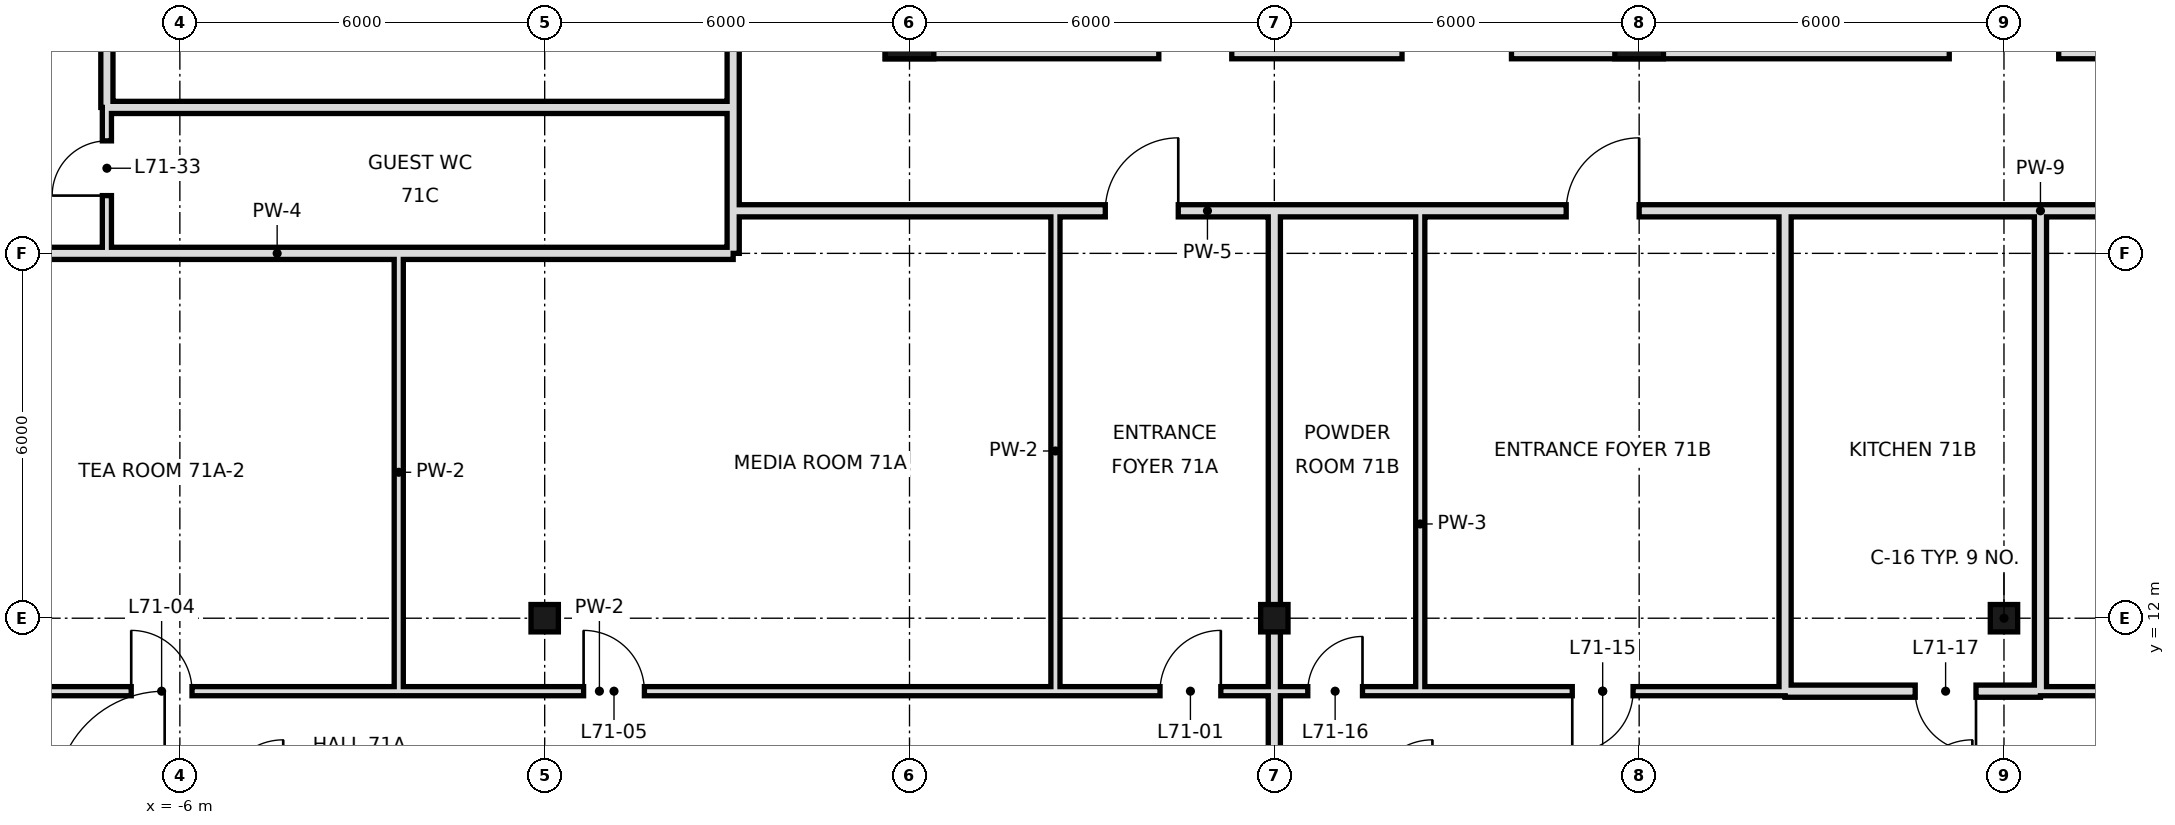
"""IFC4 building model, lengths in metres.
Left out: names, types, materials, properties, quantities, classifications, styles, units other than length and angle.
Written with IfcOpenShell. Run it as: python <this file> out.ifc"""

import sys

from ifc_helpers import new_model, si_unit, direction, frame, frame_2d, origin, origin_2d, place, context, subcontext, project, spatial, rectangle, hollow_rectangle, extrude, element, fill, save


model = new_model("IFC4")
c1 = context("Model", 3, precision=1e-05, world=origin(), true_north=direction((0.0, 1.0)))
c2 = subcontext(c1, "Body", "Model", "MODEL_VIEW")
j1 = project(units=[si_unit("LENGTHUNIT", "METRE"), si_unit("PLANEANGLEUNIT", "RADIAN")], contexts=[c1])
p1 = place(None, origin())
s1 = spatial("IfcSite", under=j1, at=p1, CompositionType="ELEMENT")
p2 = place(p1, origin())
s2 = spatial("IfcBuilding", under=s1, at=p2, CompositionType="ELEMENT")
p3 = place(p2, frame((0.0, 0.0, 301.6)))
s3 = spatial("IfcBuildingStorey", under=s2, at=p3, CompositionType="ELEMENT", Elevation=301.6)
p4 = place(p3, frame((0.0, 12.0, 0.0), z_axis=(0.0, 0.0, 1.0), x_axis=(1.0, 0.0, 0.0)))
e1 = element("IfcColumn", 1, at=p4, inside=s3, PredefinedType="COLUMN", context=c2, shape_type="SweptSolid", body=[
    extrude(hollow_rectangle(XDim=0.45, YDim=0.45, WallThickness=0.022, at=origin_2d()), origin(), (0.0, 0.0, 1.0), 3.6),
])
p5 = place(p3, frame((6.0, 21.6, 0.0), z_axis=(0.0, 0.0, 1.0), x_axis=(1.0, 0.0, 0.0)))
e2 = element("IfcColumn", 2, at=p5, inside=s3, PredefinedType="COLUMN", context=c2, shape_type="SweptSolid", body=[
    extrude(hollow_rectangle(XDim=0.8, YDim=0.8, WallThickness=0.025, at=origin_2d()), origin(), (0.0, 0.0, 1.0), 3.6),
])
p6 = place(p3, frame((12.0, 12.0, 0.0), z_axis=(0.0, 0.0, 1.0), x_axis=(1.0, 0.0, 0.0)))
e3 = element("IfcColumn", 3, at=p6, inside=s3, PredefinedType="COLUMN", context=c2, shape_type="SweptSolid", body=[
    extrude(hollow_rectangle(XDim=0.45, YDim=0.45, WallThickness=0.022, at=origin_2d()), origin(), (0.0, 0.0, 1.0), 3.6),
])
p7 = place(p3, frame((18.0, 21.6, 0.0), z_axis=(0.0, 0.0, 1.0), x_axis=(1.0, 0.0, 0.0)))
e4 = element("IfcColumn", 4, at=p7, inside=s3, PredefinedType="COLUMN", context=c2, shape_type="SweptSolid", body=[
    extrude(hollow_rectangle(XDim=0.8, YDim=0.8, WallThickness=0.025, at=origin_2d()), origin(), (0.0, 0.0, 1.0), 3.6),
])
p8 = place(p3, frame((24.0, 12.0, 0.0), z_axis=(0.0, 0.0, 1.0), x_axis=(1.0, 0.0, 0.0)))
e5 = element("IfcColumn", 5, at=p8, inside=s3, PredefinedType="COLUMN", context=c2, shape_type="SweptSolid", body=[
    extrude(hollow_rectangle(XDim=0.45, YDim=0.45, WallThickness=0.022, at=origin_2d()), origin(), (0.0, 0.0, 1.0), 3.6),
])
p9 = place(p3, frame((-2.4, 10.8, 0.0), z_axis=(0.0, 0.0, 1.0), x_axis=(0.0, 1.0, 0.0)))
e6 = element("IfcWall", 6, at=p9, inside=s3, PredefinedType="PARTITIONING", context=c2, shape_type="SweptSolid", body=[
    extrude(rectangle(XDim=7.2, YDim=0.15, at=frame_2d((3.6, 0.0))), origin(), (0.0, 0.0, 1.0), 3.42),
])
p10 = place(p3, frame((-7.2, 20.4, 0.0), z_axis=(0.0, 0.0, 1.0), x_axis=(0.0, 1.0, 0.0)))
e7 = element("IfcWall", 7, at=p10, inside=s3, PredefinedType="SOLIDWALL", context=c2, shape_type="SweptSolid", body=[
    extrude(rectangle(XDim=3.6, YDim=0.2, at=frame_2d((1.8, 0.0))), origin(), (0.0, 0.0, 1.0), 2.72),
])
p11 = place(p10, frame((1.72, 0.0, 0.0)))
e8 = element("IfcOpeningElement", 8, at=p11, cuts=e7, PredefinedType="OPENING", context=c2, shape_type="SweptSolid", body=[
    extrude(rectangle(XDim=1.0, YDim=2.4, at=frame_2d((0.5, 1.2))), frame((0.0, 0.11, 0.0), z_axis=(0.0, -1.0, 0.0), x_axis=(1.0, 0.0, 0.0)), (0.0, 0.0, 1.0), 0.22),
])
p12 = place(p3, frame((-7.2, 18.0, 0.0), z_axis=(0.0, 0.0, 1.0), x_axis=(0.0, 1.0, 0.0)))
e9 = element("IfcWall", 9, at=p12, inside=s3, PredefinedType="PARTITIONING", context=c2, shape_type="SweptSolid", body=[
    extrude(rectangle(XDim=2.4, YDim=0.15, at=frame_2d((1.2, 0.0))), origin(), (0.0, 0.0, 1.0), 3.42),
])
p13 = place(p12, frame((0.95, 0.0, 0.0)))
e10 = element("IfcOpeningElement", 10, at=p13, cuts=e9, PredefinedType="OPENING", context=c2, shape_type="SweptSolid", body=[
    extrude(rectangle(XDim=0.9, YDim=2.4, at=frame_2d((0.45, 1.2))), frame((0.0, 0.085, 0.0), z_axis=(0.0, -1.0, 0.0), x_axis=(1.0, 0.0, 0.0)), (0.0, 0.0, 1.0), 0.17),
])
p14 = place(p3, frame((12.0, 0.0, 0.0), z_axis=(0.0, 0.0, 1.0), x_axis=(0.0, 1.0, 0.0)))
e11 = element("IfcWall", 11, at=p14, inside=s3, PredefinedType="SOLIDWALL", context=c2, shape_type="SweptSolid", body=[
    extrude(rectangle(XDim=18.7, YDim=0.2, at=frame_2d((9.35, 0.0))), origin(), (0.0, 0.0, 1.0), 2.72),
])
p15 = place(p3, frame((14.4, 10.8, 0.0), z_axis=(0.0, 0.0, 1.0), x_axis=(0.0, 1.0, 0.0)))
e12 = element("IfcWall", 12, at=p15, inside=s3, PredefinedType="PARTITIONING", context=c2, shape_type="SweptSolid", body=[
    extrude(rectangle(XDim=7.9, YDim=0.15, at=frame_2d((3.95, 0.0))), origin(), (0.0, 0.0, 1.0), 3.42),
])
for number, where, z_axis, x_axis in (
    (13, (20.4, 10.8, 0.0), (0.0, 0.0, 1.0), (0.0, 1.0, 0.0)),
    (14, (24.6, 10.8, 0.0), (0.0, 0.0, 1.0), (0.0, 1.0, 0.0)),
):
    element("IfcWall", number, at=place(p3, frame(where, z_axis=z_axis, x_axis=x_axis)), inside=s3, PredefinedType="SOLIDWALL", context=c2, shape_type="SweptSolid", body=[
        extrude(rectangle(XDim=7.9, YDim=0.2, at=frame_2d((3.95, 0.0))), origin(), (0.0, 0.0, 1.0), 2.72),
    ])
p16 = place(p3, frame((3.1, 18.7, 0.0), z_axis=(0.0, 0.0, 1.0), x_axis=(0.0, 1.0, 0.0)))
e15 = element("IfcWall", 15, at=p16, inside=s3, PredefinedType="SOLIDWALL", context=c2, shape_type="SweptSolid", body=[
    extrude(rectangle(XDim=1.7, YDim=0.2, at=frame_2d((0.85, 0.0))), origin(), (0.0, 0.0, 1.0), 3.42),
])
p17 = place(p3, frame((3.1, 20.4, 0.0), z_axis=(0.0, 0.0, 1.0), x_axis=(0.0, 1.0, 0.0)))
e16 = element("IfcWall", 16, at=p17, inside=s3, PredefinedType="SOLIDWALL", context=c2, shape_type="SweptSolid", body=[
    extrude(rectangle(XDim=3.6, YDim=0.2, at=frame_2d((1.8, 0.0))), origin(), (0.0, 0.0, 1.0), 3.42),
])
p18 = place(p3, frame((3.1, 18.0, 0.0), z_axis=(0.0, 0.0, 1.0), x_axis=(0.0, 1.0, 0.0)))
e17 = element("IfcWall", 17, at=p18, inside=s3, PredefinedType="SOLIDWALL", context=c2, shape_type="SweptSolid", body=[
    extrude(rectangle(XDim=0.7, YDim=0.2, at=frame_2d((0.35, 0.0))), origin(), (0.0, 0.0, 1.0), 2.97),
])
p19 = place(p3, frame((8.4, 10.8, 0.0), z_axis=(0.0, 0.0, 1.0), x_axis=(0.0, 1.0, 0.0)))
e18 = element("IfcWall", 18, at=p19, inside=s3, PredefinedType="PARTITIONING", context=c2, shape_type="SweptSolid", body=[
    extrude(rectangle(XDim=7.9, YDim=0.15, at=frame_2d((3.95, 0.0))), origin(), (0.0, 0.0, 1.0), 3.42),
])
p20 = place(p3, frame((20.4, 10.8, 0.0), z_axis=(0.0, 0.0, 1.0), x_axis=(1.0, 0.0, 0.0)))
e19 = element("IfcWall", 19, at=p20, inside=s3, PredefinedType="SOLIDWALL", context=c2, shape_type="SweptSolid", body=[
    extrude(rectangle(XDim=4.2, YDim=0.2, at=frame_2d((2.1, 0.0))), origin(), (0.0, 0.0, 1.0), 2.72),
])
p21 = place(p20, frame((2.14, 0.0, 0.0)))
e20 = element("IfcOpeningElement", 20, at=p21, cuts=e19, PredefinedType="OPENING", context=c2, shape_type="SweptSolid", body=[
    extrude(rectangle(XDim=1.0, YDim=2.4, at=frame_2d((0.5, 1.2))), frame((0.0, 0.11, 0.0), z_axis=(0.0, -1.0, 0.0), x_axis=(1.0, 0.0, 0.0)), (0.0, 0.0, 1.0), 0.22),
])
p22 = place(p3, frame((-10.2, 10.8, 0.0), z_axis=(0.0, 0.0, 1.0), x_axis=(1.0, 0.0, 0.0)))
e21 = element("IfcWall", 21, at=p22, inside=s3, PredefinedType="PARTITIONING", context=c2, shape_type="SweptSolid", body=[
    extrude(rectangle(XDim=22.2, YDim=0.15, at=frame_2d((11.1, 0.0))), origin(), (0.0, 0.0, 1.0), 3.42),
])
p23 = place(p22, frame((20.32, 0.0, 0.0)))
e22 = element("IfcOpeningElement", 22, at=p23, cuts=e21, PredefinedType="OPENING", context=c2, shape_type="SweptSolid", body=[
    extrude(rectangle(XDim=1.0, YDim=2.4, at=frame_2d((0.5, 1.2))), frame((0.0, 0.085, 0.0), z_axis=(0.0, -1.0, 0.0), x_axis=(1.0, 0.0, 0.0)), (0.0, 0.0, 1.0), 0.17),
])
p24 = place(p22, frame((3.4, 0.0, 0.0)))
e23 = element("IfcOpeningElement", 23, at=p24, cuts=e21, PredefinedType="OPENING", context=c2, shape_type="SweptSolid", body=[
    extrude(rectangle(XDim=1.0, YDim=2.4, at=frame_2d((0.5, 1.2))), frame((0.0, 0.085, 0.0), z_axis=(0.0, -1.0, 0.0), x_axis=(1.0, 0.0, 0.0)), (0.0, 0.0, 1.0), 0.17),
])
p25 = place(p22, frame((10.84, 0.0, 0.0)))
e24 = element("IfcOpeningElement", 24, at=p25, cuts=e21, PredefinedType="OPENING", context=c2, shape_type="SweptSolid", body=[
    extrude(rectangle(XDim=1.0, YDim=2.4, at=frame_2d((0.5, 1.2))), frame((0.0, 0.085, 0.0), z_axis=(0.0, -1.0, 0.0), x_axis=(1.0, 0.0, 0.0)), (0.0, 0.0, 1.0), 0.17),
])
p26 = place(p3, frame((14.4, 10.8, 0.0), z_axis=(0.0, 0.0, 1.0), x_axis=(1.0, 0.0, 0.0)))
e25 = element("IfcWall", 25, at=p26, inside=s3, PredefinedType="PARTITIONING", context=c2, shape_type="SweptSolid", body=[
    extrude(rectangle(XDim=6.0, YDim=0.15, at=frame_2d((3.0, 0.0))), origin(), (0.0, 0.0, 1.0), 3.42),
])
p27 = place(p26, frame((2.5, 0.0, 0.0)))
e26 = element("IfcOpeningElement", 26, at=p27, cuts=e25, PredefinedType="OPENING", context=c2, shape_type="SweptSolid", body=[
    extrude(rectangle(XDim=1.0, YDim=2.4, at=frame_2d((0.5, 1.2))), frame((0.0, 0.085, 0.0), z_axis=(0.0, -1.0, 0.0), x_axis=(1.0, 0.0, 0.0)), (0.0, 0.0, 1.0), 0.17),
])
p28 = place(p3, frame((24.6, 10.8, 0.0), z_axis=(0.0, 0.0, 1.0), x_axis=(1.0, 0.0, 0.0)))
e27 = element("IfcWall", 27, at=p28, inside=s3, PredefinedType="PARTITIONING", context=c2, shape_type="SweptSolid", body=[
    extrude(rectangle(XDim=24.0, YDim=0.15, at=frame_2d((12.0, 0.0))), origin(), (0.0, 0.0, 1.0), 3.42),
])
p29 = place(p28, frame((5.5, 0.0, 0.0)))
e28 = element("IfcOpeningElement", 28, at=p29, cuts=e27, PredefinedType="OPENING", context=c2, shape_type="SweptSolid", body=[
    extrude(rectangle(XDim=1.0, YDim=2.4, at=frame_2d((0.5, 1.2))), frame((0.0, 0.085, 0.0), z_axis=(0.0, -1.0, 0.0), x_axis=(1.0, 0.0, 0.0)), (0.0, 0.0, 1.0), 0.17),
])
p30 = place(p28, frame((15.22, 0.0, 0.0)))
e29 = element("IfcOpeningElement", 29, at=p30, cuts=e27, PredefinedType="OPENING", context=c2, shape_type="SweptSolid", body=[
    extrude(rectangle(XDim=1.0, YDim=2.4, at=frame_2d((0.5, 1.2))), frame((0.0, 0.085, 0.0), z_axis=(0.0, -1.0, 0.0), x_axis=(1.0, 0.0, 0.0)), (0.0, 0.0, 1.0), 0.17),
])
p31 = place(p3, frame((12.0, 10.8, 0.0), z_axis=(0.0, 0.0, 1.0), x_axis=(1.0, 0.0, 0.0)))
e30 = element("IfcWall", 30, at=p31, inside=s3, PredefinedType="PARTITIONING", context=c2, shape_type="SweptSolid", body=[
    extrude(rectangle(XDim=2.4, YDim=0.15, at=frame_2d((1.2, 0.0))), origin(), (0.0, 0.0, 1.0), 3.42),
])
p32 = place(p31, frame((0.55, 0.0, 0.0)))
e31 = element("IfcOpeningElement", 31, at=p32, cuts=e30, PredefinedType="OPENING", context=c2, shape_type="SweptSolid", body=[
    extrude(rectangle(XDim=0.9, YDim=2.4, at=frame_2d((0.45, 1.2))), frame((0.0, 0.085, 0.0), z_axis=(0.0, -1.0, 0.0), x_axis=(1.0, 0.0, 0.0)), (0.0, 0.0, 1.0), 0.17),
])
p33 = place(p3, frame((-12.6, 18.0, 0.0), z_axis=(0.0, 0.0, 1.0), x_axis=(1.0, 0.0, 0.0)))
e32 = element("IfcWall", 32, at=p33, inside=s3, PredefinedType="SOLIDWALL", context=c2, shape_type="SweptSolid", body=[
    extrude(rectangle(XDim=15.7, YDim=0.2, at=frame_2d((7.85, 0.0))), origin(), (0.0, 0.0, 1.0), 2.72),
])
p34 = place(p3, frame((3.1, 18.7, 0.0), z_axis=(0.0, 0.0, 1.0), x_axis=(1.0, 0.0, 0.0)))
e33 = element("IfcWall", 33, at=p34, inside=s3, PredefinedType="SOLIDWALL", context=c2, shape_type="SweptSolid", body=[
    extrude(rectangle(XDim=17.3, YDim=0.2, at=frame_2d((8.65, 0.0))), origin(), (0.0, 0.0, 1.0), 2.72),
])
p35 = place(p34, frame((6.12, 0.0, 0.0)))
e34 = element("IfcOpeningElement", 34, at=p35, cuts=e33, PredefinedType="OPENING", context=c2, shape_type="SweptSolid", body=[
    extrude(rectangle(XDim=1.2, YDim=2.4, at=frame_2d((0.6, 1.2))), frame((0.0, 0.11, 0.0), z_axis=(0.0, -1.0, 0.0), x_axis=(1.0, 0.0, 0.0)), (0.0, 0.0, 1.0), 0.22),
])
p36 = place(p34, frame((13.7, 0.0, 0.0)))
e35 = element("IfcOpeningElement", 35, at=p36, cuts=e33, PredefinedType="OPENING", context=c2, shape_type="SweptSolid", body=[
    extrude(rectangle(XDim=1.2, YDim=2.4, at=frame_2d((0.6, 1.2))), frame((0.0, 0.11, 0.0), z_axis=(0.0, -1.0, 0.0), x_axis=(1.0, 0.0, 0.0)), (0.0, 0.0, 1.0), 0.22),
])
p37 = place(p3, frame((24.6, 18.7, 0.0), z_axis=(0.0, 0.0, 1.0), x_axis=(1.0, 0.0, 0.0)))
e36 = element("IfcWall", 36, at=p37, inside=s3, PredefinedType="SOLIDWALL", context=c2, shape_type="SweptSolid", body=[
    extrude(rectangle(XDim=20.3, YDim=0.2, at=frame_2d((10.15, 0.0))), origin(), (0.0, 0.0, 1.0), 2.72),
])
p38 = place(p3, frame((20.4, 18.7, 0.0), z_axis=(0.0, 0.0, 1.0), x_axis=(1.0, 0.0, 0.0)))
e37 = element("IfcWall", 37, at=p38, inside=s3, PredefinedType="SOLIDWALL", context=c2, shape_type="SweptSolid", body=[
    extrude(rectangle(XDim=4.2, YDim=0.2, at=frame_2d((2.1, 0.0))), origin(), (0.0, 0.0, 1.0), 3.42),
])
p39 = place(p3, frame((-7.2, 20.4, 0.0), z_axis=(0.0, 0.0, 1.0), x_axis=(1.0, 0.0, 0.0)))
e38 = element("IfcWall", 38, at=p39, inside=s3, PredefinedType="SOLIDWALL", context=c2, shape_type="SweptSolid", body=[
    extrude(rectangle(XDim=10.3, YDim=0.2, at=frame_2d((5.15, 0.0))), origin(), (0.0, 0.0, 1.0), 2.72),
])
p40 = place(p3, frame((5.6, 21.4, 0.0), z_axis=(0.0, 0.0, 1.0), x_axis=(1.0, 0.0, 0.0)))
e39 = element("IfcWall", 39, at=p40, inside=s3, PredefinedType="SOLIDWALL", context=c2, shape_type="SweptSolid", body=[
    extrude(rectangle(XDim=36.8, YDim=0.4, at=frame_2d((18.4, 0.0))), origin(), (0.0, 0.0, 1.0), 3.42),
])
p41 = place(p40, frame((8.5, 0.0, 0.0)))
e40 = element("IfcOpeningElement", 40, at=p41, cuts=e39, PredefinedType="OPENING", context=c2, shape_type="SweptSolid", body=[
    extrude(rectangle(XDim=1.8, YDim=2.1, at=frame_2d((0.9, 1.05))), frame((0.0, 0.21, 0.0), z_axis=(0.0, -1.0, 0.0), x_axis=(1.0, 0.0, 0.0)), (0.0, 0.0, 1.0), 0.42),
])
p42 = place(p40, frame((17.5, 0.0, 0.0)))
e41 = element("IfcOpeningElement", 41, at=p42, cuts=e39, PredefinedType="OPENING", context=c2, shape_type="SweptSolid", body=[
    extrude(rectangle(XDim=1.8, YDim=2.1, at=frame_2d((0.9, 1.05))), frame((0.0, 0.21, 0.0), z_axis=(0.0, -1.0, 0.0), x_axis=(1.0, 0.0, 0.0)), (0.0, 0.0, 1.0), 0.42),
])
p43 = place(p40, frame((26.5, 0.0, 0.0)))
e42 = element("IfcOpeningElement", 42, at=p43, cuts=e39, PredefinedType="OPENING", context=c2, shape_type="SweptSolid", body=[
    extrude(rectangle(XDim=1.8, YDim=2.1, at=frame_2d((0.9, 1.05))), frame((0.0, 0.21, 0.0), z_axis=(0.0, -1.0, 0.0), x_axis=(1.0, 0.0, 0.0)), (0.0, 0.0, 1.0), 0.42),
])
p44 = place(p40, frame((4.5, 0.0, 0.0)))
e43 = element("IfcOpeningElement", 43, at=p44, cuts=e39, PredefinedType="OPENING", context=c2, shape_type="SweptSolid", body=[
    extrude(rectangle(XDim=1.2, YDim=2.1, at=frame_2d((0.6, 1.05))), frame((0.0, 0.21, 0.0), z_axis=(0.0, -1.0, 0.0), x_axis=(1.0, 0.0, 0.0)), (0.0, 0.0, 1.0), 0.42),
])
p45 = place(p40, frame((31.1, 0.0, 0.0)))
e44 = element("IfcOpeningElement", 44, at=p45, cuts=e39, PredefinedType="OPENING", context=c2, shape_type="SweptSolid", body=[
    extrude(rectangle(XDim=1.2, YDim=2.1, at=frame_2d((0.6, 1.05))), frame((0.0, 0.21, 0.0), z_axis=(0.0, -1.0, 0.0), x_axis=(1.0, 0.0, 0.0)), (0.0, 0.0, 1.0), 0.42),
])
p46 = place(p23, frame((1.0, 0.0, 0.0), z_axis=(0.0, 0.0, 1.0), x_axis=(-1.0, 0.0, 0.0)))
e45 = element("IfcDoor", 45, at=p46, inside=s3, OperationType="SINGLE_SWING_LEFT", PredefinedType="DOOR", context=c2, shape_type="SweptSolid", body=[
    extrude(rectangle(XDim=1.0, YDim=2.4, at=frame_2d((0.5, 1.2))), frame((0.0, 0.025, 0.0), z_axis=(0.0, -1.0, 0.0), x_axis=(1.0, 0.0, 0.0)), (0.0, 0.0, 1.0), 0.05),
])
fill(e22, e45)
p47 = place(p24, origin())
e46 = element("IfcDoor", 46, at=p47, inside=s3, OperationType="SINGLE_SWING_LEFT", PredefinedType="DOOR", context=c2, shape_type="SweptSolid", body=[
    extrude(rectangle(XDim=1.0, YDim=2.4, at=frame_2d((0.5, 1.2))), frame((0.0, 0.025, 0.0), z_axis=(0.0, -1.0, 0.0), x_axis=(1.0, 0.0, 0.0)), (0.0, 0.0, 1.0), 0.05),
])
fill(e23, e46)
p48 = place(p25, origin())
e47 = element("IfcDoor", 47, at=p48, inside=s3, OperationType="SINGLE_SWING_LEFT", PredefinedType="DOOR", context=c2, shape_type="SweptSolid", body=[
    extrude(rectangle(XDim=1.0, YDim=2.4, at=frame_2d((0.5, 1.2))), frame((0.0, 0.025, 0.0), z_axis=(0.0, -1.0, 0.0), x_axis=(1.0, 0.0, 0.0)), (0.0, 0.0, 1.0), 0.05),
])
fill(e24, e47)
p49 = place(p27, frame((1.0, 0.0, 0.0), z_axis=(0.0, 0.0, 1.0), x_axis=(-1.0, 0.0, 0.0)))
e48 = element("IfcDoor", 48, at=p49, inside=s3, OperationType="SINGLE_SWING_RIGHT", PredefinedType="DOOR", context=c2, shape_type="SweptSolid", body=[
    extrude(rectangle(XDim=1.0, YDim=2.4, at=frame_2d((0.5, 1.2))), frame((0.0, 0.025, 0.0), z_axis=(0.0, -1.0, 0.0), x_axis=(1.0, 0.0, 0.0)), (0.0, 0.0, 1.0), 0.05),
])
fill(e26, e48)
p50 = place(p32, frame((0.9, 0.0, 0.0), z_axis=(0.0, 0.0, 1.0), x_axis=(-1.0, 0.0, 0.0)))
e49 = element("IfcDoor", 49, at=p50, inside=s3, OperationType="SINGLE_SWING_LEFT", PredefinedType="DOOR", context=c2, shape_type="SweptSolid", body=[
    extrude(rectangle(XDim=0.9, YDim=2.4, at=frame_2d((0.45, 1.2))), frame((0.0, 0.025, 0.0), z_axis=(0.0, -1.0, 0.0), x_axis=(1.0, 0.0, 0.0)), (0.0, 0.0, 1.0), 0.05),
])
fill(e31, e49)
p51 = place(p21, origin())
e50 = element("IfcDoor", 50, at=p51, inside=s3, OperationType="SINGLE_SWING_RIGHT", PredefinedType="DOOR", context=c2, shape_type="SweptSolid", body=[
    extrude(rectangle(XDim=1.0, YDim=2.4, at=frame_2d((0.5, 1.2))), frame((0.0, 0.025, 0.0), z_axis=(0.0, -1.0, 0.0), x_axis=(1.0, 0.0, 0.0)), (0.0, 0.0, 1.0), 0.05),
])
fill(e20, e50)
p52 = place(p13, origin())
e51 = element("IfcDoor", 51, at=p52, inside=s3, OperationType="SINGLE_SWING_LEFT", PredefinedType="DOOR", context=c2, shape_type="SweptSolid", body=[
    extrude(rectangle(XDim=0.9, YDim=2.4, at=frame_2d((0.45, 1.2))), frame((0.0, 0.025, 0.0), z_axis=(0.0, -1.0, 0.0), x_axis=(1.0, 0.0, 0.0)), (0.0, 0.0, 1.0), 0.05),
])
fill(e10, e51)
p53 = place(p35, frame((1.2, 0.0, 0.0), z_axis=(0.0, 0.0, 1.0), x_axis=(-1.0, 0.0, 0.0)))
e52 = element("IfcDoor", 52, at=p53, inside=s3, OperationType="SINGLE_SWING_LEFT", PredefinedType="DOOR", context=c2, shape_type="SweptSolid", body=[
    extrude(rectangle(XDim=1.2, YDim=2.4, at=frame_2d((0.6, 1.2))), frame((0.0, 0.025, 0.0), z_axis=(0.0, -1.0, 0.0), x_axis=(1.0, 0.0, 0.0)), (0.0, 0.0, 1.0), 0.05),
])
fill(e34, e52)
p54 = place(p36, frame((1.2, 0.0, 0.0), z_axis=(0.0, 0.0, 1.0), x_axis=(-1.0, 0.0, 0.0)))
e53 = element("IfcDoor", 53, at=p54, inside=s3, OperationType="SINGLE_SWING_LEFT", PredefinedType="DOOR", context=c2, shape_type="SweptSolid", body=[
    extrude(rectangle(XDim=1.2, YDim=2.4, at=frame_2d((0.6, 1.2))), frame((0.0, 0.025, 0.0), z_axis=(0.0, -1.0, 0.0), x_axis=(1.0, 0.0, 0.0)), (0.0, 0.0, 1.0), 0.05),
])
fill(e35, e53)
save(model, sys.argv[1])
